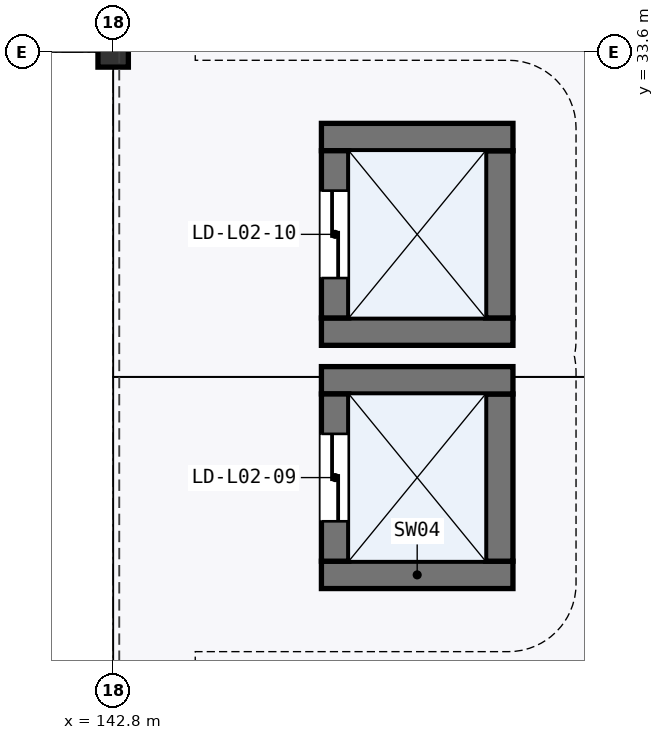
"""IFC4 building model, lengths in metres.
Left out: names, types, materials, properties, quantities, classifications, styles, units other than length and angle.
Written with IfcOpenShell. Run it as: python <this file> out.ifc"""

import sys

from ifc_helpers import new_model, si_unit, direction, frame, frame_2d, origin, origin_2d, place, context, subcontext, project, spatial, rectangle, i_section, extrude, element, fill, save


model = new_model("IFC4")
c1 = context("Model", 3, precision=1e-05, world=origin(), true_north=direction((0.0, 1.0)))
c2 = subcontext(c1, "Body", "Model", "MODEL_VIEW")
j1 = project(units=[si_unit("LENGTHUNIT", "METRE"), si_unit("PLANEANGLEUNIT", "RADIAN")], contexts=[c1])
p1 = place(None, origin())
s1 = spatial("IfcSite", under=j1, at=p1, CompositionType="ELEMENT")
p2 = place(p1, origin())
s2 = spatial("IfcBuilding", under=s1, at=p2, CompositionType="ELEMENT")
p3 = place(p2, frame((0.0, 0.0, 6.0)))
s3 = spatial("IfcBuildingStorey", under=s2, at=p3, CompositionType="ELEMENT", Elevation=6.0)
p4 = place(p3, frame((142.8, 33.6, 0.0), z_axis=(0.0, 0.0, 1.0), x_axis=(1.0, 0.0, 0.0)))
e1 = element("IfcColumn", 1, at=p4, inside=s3, PredefinedType="COLUMN", context=c2, shape_type="SweptSolid", body=[
    extrude(i_section(OverallWidth=0.4, OverallDepth=0.4, WebThickness=0.013, FlangeThickness=0.021, FilletRadius=0.022, at=origin_2d()), origin(), (0.0, 0.0, 1.0), 5.4),
])
p5 = place(p3, frame((145.54, 26.72, 0.0), z_axis=(0.0, 0.0, 1.0), x_axis=(1.0, 0.0, 0.0)))
e2 = element("IfcWall", 2, at=p5, inside=s3, PredefinedType="SHEAR", context=c2, shape_type="SweptSolid", body=[
    extrude(rectangle(XDim=2.52, YDim=0.36, at=frame_2d((1.26, 0.0))), origin(), (0.0, 0.0, 1.0), 5.145),
])
p6 = place(p3, frame((147.88, 26.9, 0.0), z_axis=(0.0, 0.0, 1.0), x_axis=(0.0, 1.0, 0.0)))
e3 = element("IfcWall", 3, at=p6, inside=s3, PredefinedType="SHEAR", context=c2, shape_type="SweptSolid", body=[
    extrude(rectangle(XDim=2.2, YDim=0.36, at=frame_2d((1.1, 0.0))), origin(), (0.0, 0.0, 1.0), 5.145),
])
p7 = place(p3, frame((148.06, 29.28, 0.0), z_axis=(0.0, 0.0, 1.0), x_axis=(-1.0, 0.0, 0.0)))
e4 = element("IfcWall", 4, at=p7, inside=s3, PredefinedType="SHEAR", context=c2, shape_type="SweptSolid", body=[
    extrude(rectangle(XDim=2.52, YDim=0.36, at=frame_2d((1.26, 0.0))), origin(), (0.0, 0.0, 1.0), 5.145),
])
p8 = place(p3, frame((145.72, 29.1, 0.0), z_axis=(0.0, 0.0, 1.0), x_axis=(0.0, -1.0, 0.0)))
e5 = element("IfcWall", 5, at=p8, inside=s3, PredefinedType="SHEAR", context=c2, shape_type="SweptSolid", body=[
    extrude(rectangle(XDim=2.2, YDim=0.36, at=frame_2d((1.1, 0.0))), origin(), (0.0, 0.0, 1.0), 5.145),
])
p9 = place(p8, frame((0.525, 0.0, 0.0)))
e6 = element("IfcOpeningElement", 6, at=p9, cuts=e5, PredefinedType="OPENING", context=c2, shape_type="SweptSolid", body=[
    extrude(rectangle(XDim=1.15, YDim=2.2, at=frame_2d((0.575, 1.1))), frame((0.0, 0.19, 0.0), z_axis=(0.0, -1.0, 0.0), x_axis=(1.0, 0.0, 0.0)), (0.0, 0.0, 1.0), 0.38),
])
p10 = place(p3, frame((145.54, 29.92, 0.0), z_axis=(0.0, 0.0, 1.0), x_axis=(1.0, 0.0, 0.0)))
e7 = element("IfcWall", 7, at=p10, inside=s3, PredefinedType="SHEAR", context=c2, shape_type="SweptSolid", body=[
    extrude(rectangle(XDim=2.52, YDim=0.36, at=frame_2d((1.26, 0.0))), origin(), (0.0, 0.0, 1.0), 5.145),
])
p11 = place(p3, frame((147.88, 30.1, 0.0), z_axis=(0.0, 0.0, 1.0), x_axis=(0.0, 1.0, 0.0)))
e8 = element("IfcWall", 8, at=p11, inside=s3, PredefinedType="SHEAR", context=c2, shape_type="SweptSolid", body=[
    extrude(rectangle(XDim=2.2, YDim=0.36, at=frame_2d((1.1, 0.0))), origin(), (0.0, 0.0, 1.0), 5.145),
])
p12 = place(p3, frame((148.06, 32.48, 0.0), z_axis=(0.0, 0.0, 1.0), x_axis=(-1.0, 0.0, 0.0)))
e9 = element("IfcWall", 9, at=p12, inside=s3, PredefinedType="SHEAR", context=c2, shape_type="SweptSolid", body=[
    extrude(rectangle(XDim=2.52, YDim=0.36, at=frame_2d((1.26, 0.0))), origin(), (0.0, 0.0, 1.0), 5.145),
])
p13 = place(p3, frame((145.72, 32.3, 0.0), z_axis=(0.0, 0.0, 1.0), x_axis=(0.0, -1.0, 0.0)))
e10 = element("IfcWall", 10, at=p13, inside=s3, PredefinedType="SHEAR", context=c2, shape_type="SweptSolid", body=[
    extrude(rectangle(XDim=2.2, YDim=0.36, at=frame_2d((1.1, 0.0))), origin(), (0.0, 0.0, 1.0), 5.145),
])
p14 = place(p13, frame((0.525, 0.0, 0.0)))
e11 = element("IfcOpeningElement", 11, at=p14, cuts=e10, PredefinedType="OPENING", context=c2, shape_type="SweptSolid", body=[
    extrude(rectangle(XDim=1.15, YDim=2.2, at=frame_2d((0.575, 1.1))), frame((0.0, 0.19, 0.0), z_axis=(0.0, -1.0, 0.0), x_axis=(1.0, 0.0, 0.0)), (0.0, 0.0, 1.0), 0.38),
])
p15 = place(p9, frame((1.15, 0.0, 0.0), z_axis=(0.0, 0.0, 1.0), x_axis=(-1.0, 0.0, 0.0)))
e12 = element("IfcDoor", 12, at=p15, inside=s3, OperationType="DOUBLE_DOOR_SLIDING", PredefinedType="DOOR", context=c2, shape_type="SweptSolid", body=[
    extrude(rectangle(XDim=1.15, YDim=2.2, at=frame_2d((0.575, 1.1))), frame((0.0, 0.025, 0.0), z_axis=(0.0, -1.0, 0.0), x_axis=(1.0, 0.0, 0.0)), (0.0, 0.0, 1.0), 0.05),
])
fill(e6, e12)
p16 = place(p14, frame((1.15, 0.0, 0.0), z_axis=(0.0, 0.0, 1.0), x_axis=(-1.0, 0.0, 0.0)))
e13 = element("IfcDoor", 13, at=p16, inside=s3, OperationType="DOUBLE_DOOR_SLIDING", PredefinedType="DOOR", context=c2, shape_type="SweptSolid", body=[
    extrude(rectangle(XDim=1.15, YDim=2.2, at=frame_2d((0.575, 1.1))), frame((0.0, 0.025, 0.0), z_axis=(0.0, -1.0, 0.0), x_axis=(1.0, 0.0, 0.0)), (0.0, 0.0, 1.0), 0.05),
])
fill(e11, e13)
save(model, sys.argv[1])
